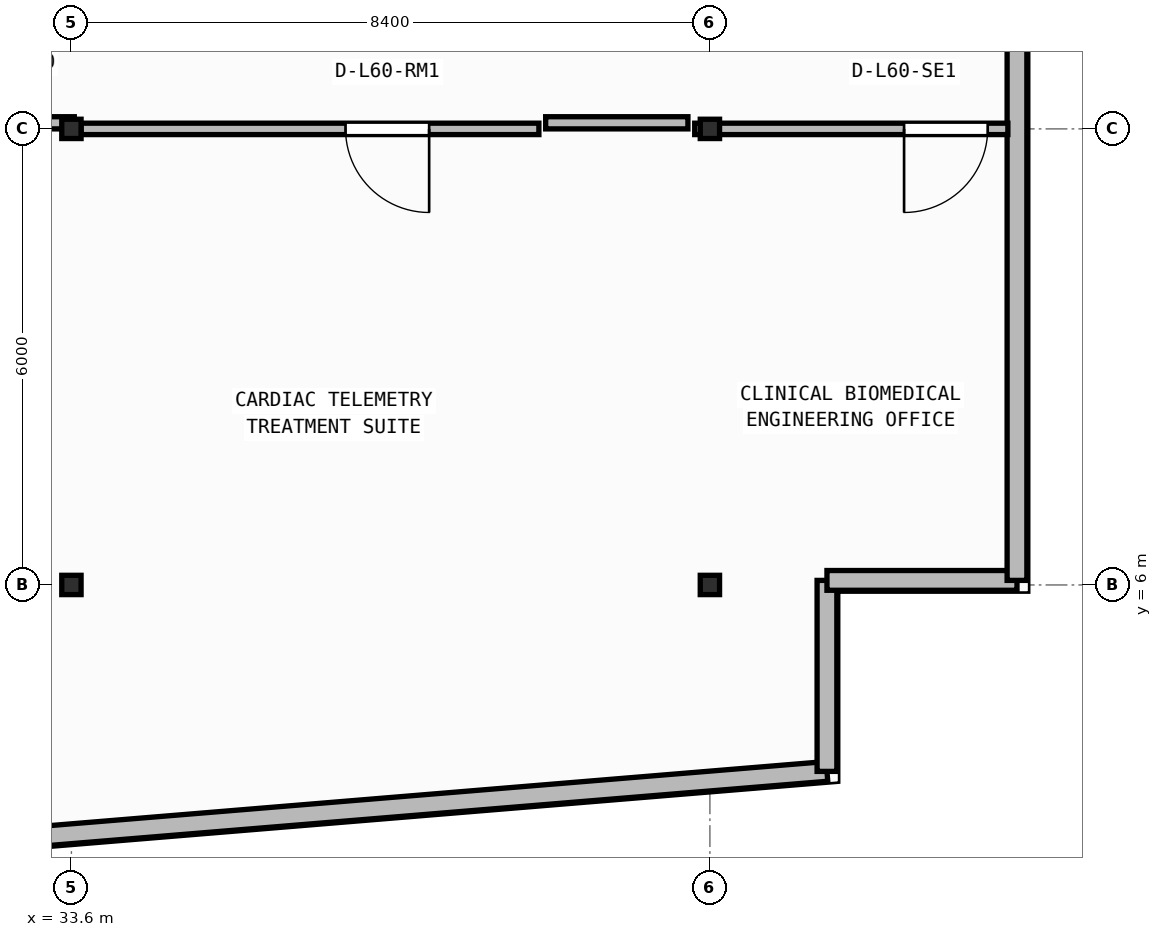
"""IFC4 building model, lengths in metres.
Left out: names, types, materials, properties, quantities, classifications, styles, units other than length and angle.
Written with IfcOpenShell. Run it as: python <this file> out.ifc"""

import sys

from ifc_helpers import new_model, si_unit, direction, frame, frame_2d, origin, origin_2d, place, context, subcontext, project, spatial, rectangle, i_section, extrude, element, fill, save


model = new_model("IFC4")
c1 = context("Model", 3, precision=1e-05, world=origin(), true_north=direction((0.0, 1.0)))
c2 = subcontext(c1, "Body", "Model", "MODEL_VIEW")
j1 = project(units=[si_unit("LENGTHUNIT", "METRE"), si_unit("PLANEANGLEUNIT", "RADIAN")], contexts=[c1])
p1 = place(None, origin())
s1 = spatial("IfcSite", under=j1, at=p1, CompositionType="ELEMENT")
p2 = place(p1, origin())
s2 = spatial("IfcBuilding", under=s1, at=p2, CompositionType="ELEMENT")
p3 = place(p2, frame((0.0, 0.0, 244.7)))
s3 = spatial("IfcBuildingStorey", under=s2, at=p3, CompositionType="ELEMENT", Elevation=244.7)
for number, where, z_axis, x_axis in (
    (1, (33.6, 6.0, 0.0), (0.0, 0.0, 1.0), (1.0, 0.0, 0.0)),
    (2, (42.0, 6.0, 0.0), (0.0, 0.0, 1.0), (1.0, 0.0, 0.0)),
    (3, (33.6, 12.0, 0.0), (0.0, 0.0, 1.0), (1.0, 0.0, 0.0)),
    (4, (42.0, 12.0, 0.0), (0.0, 0.0, 1.0), (1.0, 0.0, 0.0)),
):
    element("IfcColumn", number, at=place(p3, frame(where, z_axis=z_axis, x_axis=x_axis)), inside=s3, PredefinedType="COLUMN", context=c2, shape_type="SweptSolid", body=[
        extrude(i_section(OverallWidth=0.254, OverallDepth=0.254, WebThickness=0.009, FlangeThickness=0.014, FilletRadius=0.013, at=origin_2d()), origin(), (0.0, 0.0, 1.0), 3.95),
    ])
p4 = place(p3, frame((2.66, 0.174, 0.0), z_axis=(0.0, 0.0, 1.0), x_axis=(0.996611813627, 0.082248969229, 0.0)))
e5 = element("IfcWall", 5, at=p4, inside=s3, PredefinedType="STANDARD", context=c2, shape_type="SweptSolid", body=[
    extrude(rectangle(XDim=41.019, YDim=0.26, at=frame_2d((20.51, 0.0))), origin(), (0.0, 0.0, 1.0), 3.71),
])
p5 = place(p4, frame((19.31, 0.0, 0.9)))
e6 = element("IfcOpeningElement", 6, at=p5, cuts=e5, PredefinedType="OPENING", context=c2, shape_type="SweptSolid", body=[
    extrude(rectangle(XDim=2.4, YDim=1.65, at=frame_2d((1.2, 0.825))), frame((0.0, 0.14, 0.0), z_axis=(0.0, -1.0, 0.0), x_axis=(1.0, 0.0, 0.0)), (0.0, 0.0, 1.0), 0.28),
])
p6 = place(p3, frame((43.54, 3.547, 0.0), z_axis=(0.0, 0.0, 1.0), x_axis=(0.0, 1.0, 0.0)))
e7 = element("IfcWall", 7, at=p6, inside=s3, PredefinedType="STANDARD", context=c2, shape_type="SweptSolid", body=[
    extrude(rectangle(XDim=2.513, YDim=0.26, at=frame_2d((1.256, 0.0))), origin(), (0.0, 0.0, 1.0), 3.71),
])
p7 = place(p3, frame((43.54, 6.06, 0.0), z_axis=(0.0, 0.0, 1.0), x_axis=(1.0, 0.0, 0.0)))
e8 = element("IfcWall", 8, at=p7, inside=s3, PredefinedType="STANDARD", context=c2, shape_type="SweptSolid", body=[
    extrude(rectangle(XDim=2.5, YDim=0.26, at=frame_2d((1.25, 0.0))), origin(), (0.0, 0.0, 1.0), 3.71),
])
p8 = place(p3, frame((46.04, 6.06, 0.0), z_axis=(0.0, 0.0, 1.0), x_axis=(0.0, 1.0, 0.0)))
e9 = element("IfcWall", 9, at=p8, inside=s3, PredefinedType="STANDARD", context=c2, shape_type="SweptSolid", body=[
    extrude(rectangle(XDim=21.88, YDim=0.26, at=frame_2d((10.94, 0.0))), origin(), (0.0, 0.0, 1.0), 3.71),
])
p9 = place(p8, frame((10.29, 0.0, 0.0)))
e10 = element("IfcOpeningElement", 10, at=p9, cuts=e9, PredefinedType="OPENING", context=c2, shape_type="SweptSolid", body=[
    extrude(rectangle(XDim=1.3, YDim=2.15, at=frame_2d((0.65, 1.075))), frame((0.0, 0.14, 0.0), z_axis=(0.0, -1.0, 0.0), x_axis=(1.0, 0.0, 0.0)), (0.0, 0.0, 1.0), 0.28),
])
p10 = place(p3, frame((39.75, 12.0, 0.0), z_axis=(0.0, 0.0, 1.0), x_axis=(-1.0, 0.0, 0.0)))
e11 = element("IfcWall", 11, at=p10, inside=s3, PredefinedType="PARTITIONING", context=c2, shape_type="SweptSolid", body=[
    extrude(rectangle(XDim=6.023, YDim=0.15, at=frame_2d((3.011, 0.0))), origin(), (0.0, 0.0, 1.0), 3.157),
])
p11 = place(p10, frame((1.444, 0.0, 0.0)))
e12 = element("IfcOpeningElement", 12, at=p11, cuts=e11, PredefinedType="OPENING", context=c2, shape_type="SweptSolid", body=[
    extrude(rectangle(XDim=1.1, YDim=2.1, at=frame_2d((0.55, 1.05))), frame((0.0, 0.085, 0.0), z_axis=(0.0, -1.0, 0.0), x_axis=(1.0, 0.0, 0.0)), (0.0, 0.0, 1.0), 0.17),
])
p12 = place(p3, frame((45.92, 12.0, 0.0), z_axis=(0.0, 0.0, 1.0), x_axis=(-1.0, 0.0, 0.0)))
e13 = element("IfcWall", 13, at=p12, inside=s3, PredefinedType="PARTITIONING", context=c2, shape_type="SweptSolid", body=[
    extrude(rectangle(XDim=4.12, YDim=0.15, at=frame_2d((2.06, 0.0))), origin(), (0.0, 0.0, 1.0), 3.157),
])
p13 = place(p12, frame((0.265, 0.0, 0.0)))
e14 = element("IfcOpeningElement", 14, at=p13, cuts=e13, PredefinedType="OPENING", context=c2, shape_type="SweptSolid", body=[
    extrude(rectangle(XDim=1.1, YDim=2.1, at=frame_2d((0.55, 1.05))), frame((0.0, 0.085, 0.0), z_axis=(0.0, -1.0, 0.0), x_axis=(1.0, 0.0, 0.0)), (0.0, 0.0, 1.0), 0.17),
])
p14 = place(p3, frame((31.439, 12.08, 0.0), z_axis=(0.0, 0.0, 1.0), x_axis=(1.0, 0.0, 0.0)))
e15 = element("IfcWall", 15, at=p14, inside=s3, PredefinedType="PARTITIONING", context=c2, shape_type="SweptSolid", body=[
    extrude(rectangle(XDim=2.198, YDim=0.16, at=frame_2d((1.099, 0.0))), origin(), (0.0, 0.0, 1.0), 3.157),
])
p15 = place(p3, frame((39.839, 12.08, 0.0), z_axis=(0.0, 0.0, 1.0), x_axis=(1.0, 0.0, 0.0)))
e16 = element("IfcWall", 16, at=p15, inside=s3, PredefinedType="PARTITIONING", context=c2, shape_type="SweptSolid", body=[
    extrude(rectangle(XDim=1.871, YDim=0.16, at=frame_2d((0.936, 0.0))), origin(), (0.0, 0.0, 1.0), 3.157),
])
p16 = place(p11, origin())
e17 = element("IfcDoor", 17, at=p16, inside=s3, OperationType="SINGLE_SWING_LEFT", PredefinedType="DOOR", context=c2, shape_type="SweptSolid", body=[
    extrude(rectangle(XDim=1.1, YDim=2.1, at=frame_2d((0.55, 1.05))), frame((0.0, 0.025, 0.0), z_axis=(0.0, -1.0, 0.0), x_axis=(1.0, 0.0, 0.0)), (0.0, 0.0, 1.0), 0.05),
])
fill(e12, e17)
p17 = place(p13, origin())
e18 = element("IfcDoor", 18, at=p17, inside=s3, OperationType="SINGLE_SWING_RIGHT", PredefinedType="DOOR", context=c2, shape_type="SweptSolid", body=[
    extrude(rectangle(XDim=1.1, YDim=2.1, at=frame_2d((0.55, 1.05))), frame((0.0, 0.025, 0.0), z_axis=(0.0, -1.0, 0.0), x_axis=(1.0, 0.0, 0.0)), (0.0, 0.0, 1.0), 0.05),
])
fill(e14, e18)
save(model, sys.argv[1])
